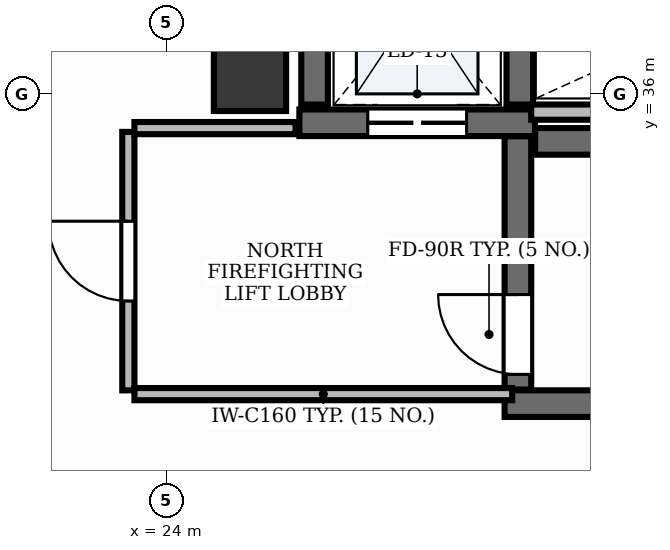
"""IFC4 building model, lengths in metres.
Left out: names, types, materials, properties, quantities, classifications, styles, units other than length and angle.
Written with IfcOpenShell. Run it as: python <this file> out.ifc"""

import sys

from ifc_helpers import new_model, si_unit, direction, frame, frame_2d, origin, origin_2d, place, context, subcontext, project, spatial, rectangle, extrude, element, fill, save


model = new_model("IFC4")
c1 = context("Model", 3, precision=1e-05, world=origin(), true_north=direction((0.0, 1.0)))
c2 = subcontext(c1, "Body", "Model", "MODEL_VIEW")
j1 = project(units=[si_unit("LENGTHUNIT", "METRE"), si_unit("PLANEANGLEUNIT", "RADIAN")], contexts=[c1])
p1 = place(None, origin())
s1 = spatial("IfcSite", under=j1, at=p1, CompositionType="ELEMENT")
p2 = place(p1, origin())
s2 = spatial("IfcBuilding", under=s1, at=p2, CompositionType="ELEMENT")
p3 = place(p2, frame((0.0, 0.0, 301.8)))
s3 = spatial("IfcBuildingStorey", under=s2, at=p3, CompositionType="ELEMENT", Elevation=301.8)
p4 = place(p3, frame((28.852, 35.375, 0.0), z_axis=(0.0, 0.0, 1.0), x_axis=(1.0, 0.0, 0.0)))
e1 = element("IfcWall", 1, at=p4, inside=s3, PredefinedType="SHEAR", context=c2, shape_type="SweptSolid", body=[
    extrude(rectangle(XDim=8.148, YDim=0.35, at=frame_2d((4.074, 0.0))), origin(), (0.0, 0.0, 1.0), 3.9),
])
p5 = place(p3, frame((28.45, 31.925, 0.0), z_axis=(0.0, 0.0, 1.0), x_axis=(1.0, 0.0, 0.0)))
e2 = element("IfcWall", 2, at=p5, inside=s3, PredefinedType="SHEAR", context=c2, shape_type="SweptSolid", body=[
    extrude(rectangle(XDim=8.55, YDim=0.35, at=frame_2d((4.275, 0.0))), origin(), (0.0, 0.0, 1.0), 3.9),
])
p6 = place(p3, frame((28.625, 32.11, 0.0), z_axis=(0.0, 0.0, 1.0), x_axis=(0.0, 1.0, 0.0)))
e3 = element("IfcWall", 3, at=p6, inside=s3, PredefinedType="SHEAR", context=c2, shape_type="SweptSolid", body=[
    extrude(rectangle(XDim=3.333, YDim=0.35, at=frame_2d((1.667, 0.0))), origin(), (0.0, 0.0, 1.0), 3.9),
])
p7 = place(p6, frame((0.2, 0.0, 0.0)))
e4 = element("IfcOpeningElement", 4, at=p7, cuts=e3, PredefinedType="OPENING", context=c2, shape_type="SweptSolid", body=[
    extrude(rectangle(XDim=1.05, YDim=2.15, at=frame_2d((0.525, 1.075))), frame((0.0, 0.19, 0.0), z_axis=(0.0, -1.0, 0.0), x_axis=(1.0, 0.0, 0.0)), (0.0, 0.0, 1.0), 0.38),
])
p8 = place(p3, frame((25.75, 35.62, 0.0), z_axis=(0.0, 0.0, 1.0), x_axis=(1.0, 0.0, 0.0)))
e5 = element("IfcWall", 5, at=p8, inside=s3, PredefinedType="SHEAR", context=c2, shape_type="SweptSolid", body=[
    extrude(rectangle(XDim=3.1, YDim=0.35, at=frame_2d((1.55, 0.0))), origin(), (0.0, 0.0, 1.0), 3.9),
])
p9 = place(p8, frame((0.9, 0.0, 0.0)))
e6 = element("IfcOpeningElement", 6, at=p9, cuts=e5, PredefinedType="OPENING", context=c2, shape_type="SweptSolid", body=[
    extrude(rectangle(XDim=1.3, YDim=2.2, at=frame_2d((0.65, 1.1))), frame((0.0, 0.19, 0.0), z_axis=(0.0, -1.0, 0.0), x_axis=(1.0, 0.0, 0.0)), (0.0, 0.0, 1.0), 0.38),
])
for number, where, z_axis, x_axis in (
    (7, (25.95, 35.86, 0.0), (0.0, 0.0, 1.0), (0.0, 1.0, 0.0)),
    (8, (28.65, 35.86, 0.0), (0.0, 0.0, 1.0), (0.0, 1.0, 0.0)),
):
    element("IfcWall", number, at=place(p3, frame(where, z_axis=z_axis, x_axis=x_axis)), inside=s3, PredefinedType="SHEAR", context=c2, shape_type="SweptSolid", body=[
        extrude(rectangle(XDim=2.7, YDim=0.35, at=frame_2d((1.35, 0.0))), origin(), (0.0, 0.0, 1.0), 3.9),
    ])
p10 = place(p3, frame((25.1, 36.25, -0.0), z_axis=(0.0, 0.0, 1.0), x_axis=(1.0, 0.0, 0.0)))
e9 = element("IfcColumn", 9, at=p10, inside=s3, PredefinedType="PILASTER", context=c2, shape_type="SweptSolid", body=[
    extrude(rectangle(XDim=0.95, YDim=0.95, at=origin_2d()), origin(), (0.0, 0.0, 1.0), 3.901),
])
p11 = place(p3, frame((28.8, 35.76, 0.0), z_axis=(0.0, 0.0, 1.0), x_axis=(1.0, 0.0, 0.0)))
e10 = element("IfcWall", 10, at=p11, inside=s3, PredefinedType="PARTITIONING", context=c2, shape_type="SweptSolid", body=[
    extrude(rectangle(XDim=4.57, YDim=0.2, at=frame_2d((2.285, 0.0))), origin(), (0.0, 0.0, 1.0), 2.22),
])
p12 = place(p3, frame((23.5, 32.1, 0.0), z_axis=(0.0, 0.0, 1.0), x_axis=(0.0, 1.0, 0.0)))
e11 = element("IfcWall", 11, at=p12, inside=s3, PredefinedType="PARTITIONING", context=c2, shape_type="SweptSolid", body=[
    extrude(rectangle(XDim=3.4, YDim=0.16, at=frame_2d((1.7, 0.0))), origin(), (0.0, 0.0, 1.0), 2.22),
])
p13 = place(p12, frame((1.175, 0.0, 0.0)))
e12 = element("IfcOpeningElement", 12, at=p13, cuts=e11, PredefinedType="OPENING", context=c2, shape_type="SweptSolid", body=[
    extrude(rectangle(XDim=1.05, YDim=2.15, at=frame_2d((0.525, 1.075))), frame((0.0, 0.095, 0.0), z_axis=(0.0, -1.0, 0.0), x_axis=(1.0, 0.0, 0.0)), (0.0, 0.0, 1.0), 0.19),
])
p14 = place(p3, frame((23.58, 32.05, 0.0), z_axis=(0.0, 0.0, 1.0), x_axis=(1.0, 0.0, 0.0)))
e13 = element("IfcWall", 13, at=p14, inside=s3, PredefinedType="PARTITIONING", context=c2, shape_type="SweptSolid", body=[
    extrude(rectangle(XDim=4.97, YDim=0.16, at=frame_2d((2.485, 0.0))), origin(), (0.0, 0.0, 1.0), 2.22),
])
p15 = place(p3, frame((23.58, 35.55, 0.0), z_axis=(0.0, 0.0, 1.0), x_axis=(1.0, 0.0, 0.0)))
e14 = element("IfcWall", 14, at=p15, inside=s3, PredefinedType="PARTITIONING", context=c2, shape_type="SweptSolid", body=[
    extrude(rectangle(XDim=2.12, YDim=0.16, at=frame_2d((1.06, 0.0))), origin(), (0.0, 0.0, 1.0), 2.22),
])
p16 = place(p7, origin())
e15 = element("IfcDoor", 15, at=p16, inside=s3, OperationType="SINGLE_SWING_RIGHT", PredefinedType="DOOR", context=c2, shape_type="SweptSolid", body=[
    extrude(rectangle(XDim=1.05, YDim=2.15, at=frame_2d((0.525, 1.075))), frame((0.0, 0.025, 0.0), z_axis=(0.0, -1.0, 0.0), x_axis=(1.0, 0.0, 0.0)), (0.0, 0.0, 1.0), 0.05),
])
fill(e4, e15)
p17 = place(p9, origin())
e16 = element("IfcDoor", 16, at=p17, inside=s3, OperationType="DOUBLE_DOOR_SLIDING", PredefinedType="DOOR", context=c2, shape_type="SweptSolid", body=[
    extrude(rectangle(XDim=1.3, YDim=2.2, at=frame_2d((0.65, 1.1))), frame((0.0, 0.025, 0.0), z_axis=(0.0, -1.0, 0.0), x_axis=(1.0, 0.0, 0.0)), (0.0, 0.0, 1.0), 0.05),
])
fill(e6, e16)
p18 = place(p13, origin())
e17 = element("IfcDoor", 17, at=p18, inside=s3, OperationType="SINGLE_SWING_RIGHT", PredefinedType="DOOR", context=c2, shape_type="SweptSolid", body=[
    extrude(rectangle(XDim=1.05, YDim=2.15, at=frame_2d((0.525, 1.075))), frame((0.0, 0.025, 0.0), z_axis=(0.0, -1.0, 0.0), x_axis=(1.0, 0.0, 0.0)), (0.0, 0.0, 1.0), 0.05),
])
fill(e12, e17)
save(model, sys.argv[1])
